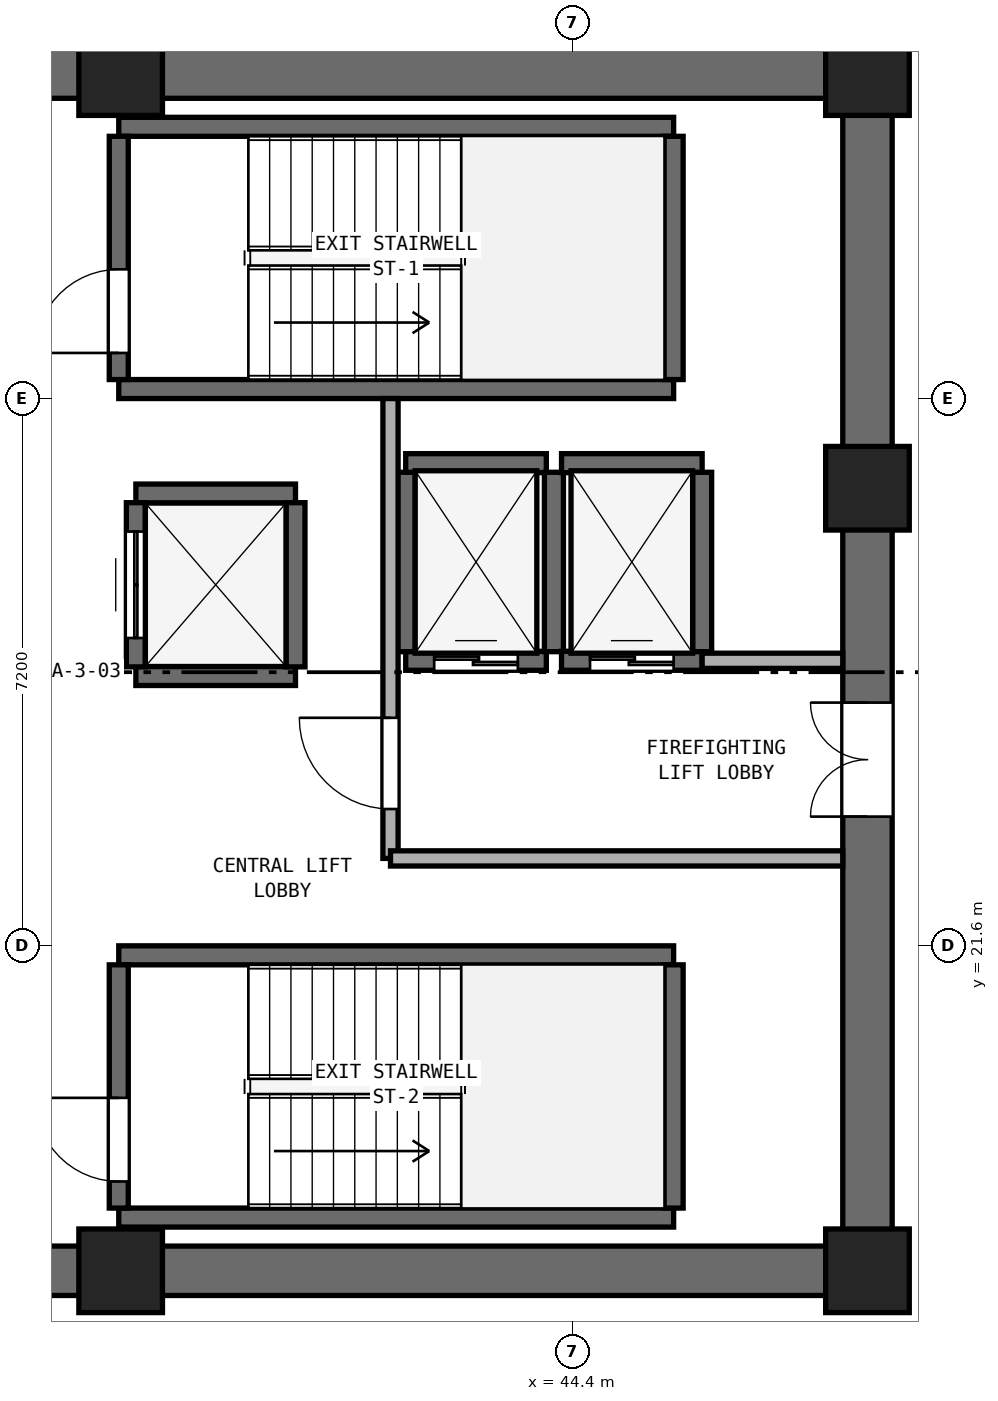
"""IFC4 building model, lengths in metres.
Left out: names, types, materials, properties, quantities, classifications, styles, units other than length and angle.
Written with IfcOpenShell. Run it as: python <this file> out.ifc"""

import sys

from ifc_helpers import new_model, si_unit, direction, frame, frame_2d, origin, origin_2d, place, context, subcontext, project, spatial, rectangle, extrude, element, fill, save


model = new_model("IFC4")
c1 = context("Model", 3, precision=1e-05, world=origin(), true_north=direction((0.0, 1.0)))
c2 = subcontext(c1, "Body", "Model", "MODEL_VIEW")
j1 = project(units=[si_unit("LENGTHUNIT", "METRE"), si_unit("PLANEANGLEUNIT", "RADIAN")], contexts=[c1])
p1 = place(None, origin())
s1 = spatial("IfcSite", under=j1, at=p1, CompositionType="ELEMENT")
p2 = place(p1, origin())
s2 = spatial("IfcBuilding", under=s1, at=p2, CompositionType="ELEMENT")
p3 = place(p2, frame((0.0, 0.0, 44.0)))
s3 = spatial("IfcBuildingStorey", under=s2, at=p3, CompositionType="ELEMENT", Elevation=44.0)
for number, where, z_axis, x_axis in (
    (1, (25.4, 17.325, 0.0), (0.0, 0.0, 1.0), (1.0, 0.0, 0.0)),
    (2, (25.4, 33.075, 0.0), (0.0, 0.0, 1.0), (1.0, 0.0, 0.0)),
):
    element("IfcWall", number, at=place(p3, frame(where, z_axis=z_axis, x_axis=x_axis)), inside=s3, PredefinedType="SHEAR", context=c2, shape_type="SweptSolid", body=[
        extrude(rectangle(XDim=23.2, YDim=0.65, at=frame_2d((11.6, 0.0))), origin(), (0.0, 0.0, 1.0), 3.525),
    ])
p4 = place(p3, frame((48.275, 17.65, 0.0), z_axis=(0.0, 0.0, 1.0), x_axis=(0.0, 1.0, 0.0)))
e3 = element("IfcWall", 3, at=p4, inside=s3, PredefinedType="SHEAR", context=c2, shape_type="SweptSolid", body=[
    extrude(rectangle(XDim=15.1, YDim=0.65, at=frame_2d((7.55, 0.0))), origin(), (0.0, 0.0, 1.0), 3.525),
])
p5 = place(p4, frame((5.65, 0.0, 0.0)))
e4 = element("IfcOpeningElement", 4, at=p5, cuts=e3, PredefinedType="OPENING", context=c2, shape_type="SweptSolid", body=[
    extrude(rectangle(XDim=1.5, YDim=2.15, at=frame_2d((0.75, 1.075))), frame((0.0, 0.335, 0.0), z_axis=(0.0, -1.0, 0.0), x_axis=(1.0, 0.0, 0.0)), (0.0, 0.0, 1.0), 0.67),
])
for number, where, z_axis, x_axis in (
    (5, (38.45, 17.325, 0.0), (0.0, 0.0, 1.0), (1.0, 0.0, 0.0)),
    (6, (48.275, 17.325, 0.0), (0.0, 0.0, 1.0), (1.0, 0.0, 0.0)),
    (7, (48.275, 27.62, 0.0), (0.0, 0.0, 1.0), (1.0, 0.0, 0.0)),
    (8, (48.275, 33.075, 0.0), (0.0, 0.0, 1.0), (1.0, 0.0, 0.0)),
    (9, (38.45, 33.075, 0.0), (0.0, 0.0, 1.0), (1.0, 0.0, 0.0)),
):
    element("IfcColumn", number, at=place(p3, frame(where, z_axis=z_axis, x_axis=x_axis)), inside=s3, PredefinedType="PILASTER", context=c2, shape_type="SweptSolid", body=[
        extrude(rectangle(XDim=1.1, YDim=1.1, at=origin_2d()), origin(), (0.0, 0.0, 1.0), 3.8),
    ])
for number, where, z_axis, x_axis in (
    (10, (38.425, 28.925, 0.0), (0.0, 0.0, 1.0), (1.0, 0.0, 0.0)),
    (11, (38.425, 32.375, 0.0), (0.0, 0.0, 1.0), (1.0, 0.0, 0.0)),
):
    element("IfcWall", number, at=place(p3, frame(where, z_axis=z_axis, x_axis=x_axis)), inside=s3, PredefinedType="SHEAR", context=c2, shape_type="SweptSolid", body=[
        extrude(rectangle(XDim=7.3, YDim=0.25, at=frame_2d((3.65, 0.0))), origin(), (0.0, 0.0, 1.0), 3.525),
    ])
p6 = place(p3, frame((38.425, 29.05, 0.0), z_axis=(0.0, 0.0, 1.0), x_axis=(0.0, 1.0, 0.0)))
e12 = element("IfcWall", 12, at=p6, inside=s3, PredefinedType="SHEAR", context=c2, shape_type="SweptSolid", body=[
    extrude(rectangle(XDim=3.2, YDim=0.25, at=frame_2d((1.6, 0.0))), origin(), (0.0, 0.0, 1.0), 3.525),
])
p7 = place(p6, frame((0.35, 0.0, 0.0)))
e13 = element("IfcOpeningElement", 13, at=p7, cuts=e12, PredefinedType="OPENING", context=c2, shape_type="SweptSolid", body=[
    extrude(rectangle(XDim=1.1, YDim=2.15, at=frame_2d((0.55, 1.075))), frame((0.0, 0.135, 0.0), z_axis=(0.0, -1.0, 0.0), x_axis=(1.0, 0.0, 0.0)), (0.0, 0.0, 1.0), 0.27),
])
p8 = place(p3, frame((45.725, 29.05, 0.0), z_axis=(0.0, 0.0, 1.0), x_axis=(0.0, 1.0, 0.0)))
e14 = element("IfcWall", 14, at=p8, inside=s3, PredefinedType="SHEAR", context=c2, shape_type="SweptSolid", body=[
    extrude(rectangle(XDim=3.2, YDim=0.25, at=frame_2d((1.6, 0.0))), origin(), (0.0, 0.0, 1.0), 3.525),
])
for number, where, z_axis, x_axis in (
    (15, (38.425, 18.025, 0.0), (0.0, 0.0, 1.0), (1.0, 0.0, 0.0)),
    (16, (38.425, 21.475, 0.0), (0.0, 0.0, 1.0), (1.0, 0.0, 0.0)),
):
    element("IfcWall", number, at=place(p3, frame(where, z_axis=z_axis, x_axis=x_axis)), inside=s3, PredefinedType="SHEAR", context=c2, shape_type="SweptSolid", body=[
        extrude(rectangle(XDim=7.3, YDim=0.25, at=frame_2d((3.65, 0.0))), origin(), (0.0, 0.0, 1.0), 3.525),
    ])
p9 = place(p3, frame((38.425, 18.15, 0.0), z_axis=(0.0, 0.0, 1.0), x_axis=(0.0, 1.0, 0.0)))
e17 = element("IfcWall", 17, at=p9, inside=s3, PredefinedType="SHEAR", context=c2, shape_type="SweptSolid", body=[
    extrude(rectangle(XDim=3.2, YDim=0.25, at=frame_2d((1.6, 0.0))), origin(), (0.0, 0.0, 1.0), 3.525),
])
p10 = place(p9, frame((0.35, 0.0, 0.0)))
e18 = element("IfcOpeningElement", 18, at=p10, cuts=e17, PredefinedType="OPENING", context=c2, shape_type="SweptSolid", body=[
    extrude(rectangle(XDim=1.1, YDim=2.15, at=frame_2d((0.55, 1.075))), frame((0.0, 0.135, 0.0), z_axis=(0.0, -1.0, 0.0), x_axis=(1.0, 0.0, 0.0)), (0.0, 0.0, 1.0), 0.27),
])
p11 = place(p3, frame((45.725, 18.15, 0.0), z_axis=(0.0, 0.0, 1.0), x_axis=(0.0, 1.0, 0.0)))
e19 = element("IfcWall", 19, at=p11, inside=s3, PredefinedType="SHEAR", context=c2, shape_type="SweptSolid", body=[
    extrude(rectangle(XDim=3.2, YDim=0.25, at=frame_2d((1.6, 0.0))), origin(), (0.0, 0.0, 1.0), 3.525),
])
p12 = place(p3, frame((42.2, 25.35, 0.0), z_axis=(0.0, 0.0, 1.0), x_axis=(1.0, 0.0, 0.0)))
e20 = element("IfcWall", 20, at=p12, inside=s3, PredefinedType="SHEAR", context=c2, shape_type="SweptSolid", body=[
    extrude(rectangle(XDim=1.85, YDim=0.25, at=frame_2d((0.925, 0.0))), origin(), (0.0, 0.0, 1.0), 3.525),
])
p13 = place(p12, frame((0.375, 0.0, 0.0)))
e21 = element("IfcOpeningElement", 21, at=p13, cuts=e20, PredefinedType="OPENING", context=c2, shape_type="SweptSolid", body=[
    extrude(rectangle(XDim=1.1, YDim=2.15, at=frame_2d((0.55, 1.075))), frame((0.0, 0.135, 0.0), z_axis=(0.0, -1.0, 0.0), x_axis=(1.0, 0.0, 0.0)), (0.0, 0.0, 1.0), 0.27),
])
p14 = place(p3, frame((42.2, 27.95, 0.0), z_axis=(0.0, 0.0, 1.0), x_axis=(1.0, 0.0, 0.0)))
e22 = element("IfcWall", 22, at=p14, inside=s3, PredefinedType="SHEAR", context=c2, shape_type="SweptSolid", body=[
    extrude(rectangle(XDim=1.85, YDim=0.25, at=frame_2d((0.925, 0.0))), origin(), (0.0, 0.0, 1.0), 3.525),
])
for number, where, z_axis, x_axis in (
    (23, (42.2, 25.47, 0.0), (0.0, 0.0, 1.0), (0.0, 1.0, 0.0)),
    (24, (44.15, 25.47, 0.0), (0.0, 0.0, 1.0), (0.0, 1.0, 0.0)),
):
    element("IfcWall", number, at=place(p3, frame(where, z_axis=z_axis, x_axis=x_axis)), inside=s3, PredefinedType="SHEAR", context=c2, shape_type="SweptSolid", body=[
        extrude(rectangle(XDim=2.36, YDim=0.25, at=frame_2d((1.18, 0.0))), origin(), (0.0, 0.0, 1.0), 3.525),
    ])
p15 = place(p3, frame((44.25, 25.35, 0.0), z_axis=(0.0, 0.0, 1.0), x_axis=(1.0, 0.0, 0.0)))
e25 = element("IfcWall", 25, at=p15, inside=s3, PredefinedType="SHEAR", context=c2, shape_type="SweptSolid", body=[
    extrude(rectangle(XDim=1.85, YDim=0.25, at=frame_2d((0.925, 0.0))), origin(), (0.0, 0.0, 1.0), 3.525),
])
p16 = place(p15, frame((0.375, 0.0, 0.0)))
e26 = element("IfcOpeningElement", 26, at=p16, cuts=e25, PredefinedType="OPENING", context=c2, shape_type="SweptSolid", body=[
    extrude(rectangle(XDim=1.1, YDim=2.15, at=frame_2d((0.55, 1.075))), frame((0.0, 0.135, 0.0), z_axis=(0.0, -1.0, 0.0), x_axis=(1.0, 0.0, 0.0)), (0.0, 0.0, 1.0), 0.27),
])
p17 = place(p3, frame((44.25, 27.95, 0.0), z_axis=(0.0, 0.0, 1.0), x_axis=(1.0, 0.0, 0.0)))
e27 = element("IfcWall", 27, at=p17, inside=s3, PredefinedType="SHEAR", context=c2, shape_type="SweptSolid", body=[
    extrude(rectangle(XDim=1.85, YDim=0.25, at=frame_2d((0.925, 0.0))), origin(), (0.0, 0.0, 1.0), 3.525),
])
p18 = place(p3, frame((46.1, 25.47, 0.0), z_axis=(0.0, 0.0, 1.0), x_axis=(0.0, 1.0, 0.0)))
e28 = element("IfcWall", 28, at=p18, inside=s3, PredefinedType="SHEAR", context=c2, shape_type="SweptSolid", body=[
    extrude(rectangle(XDim=2.36, YDim=0.25, at=frame_2d((1.18, 0.0))), origin(), (0.0, 0.0, 1.0), 3.525),
])
for number, where, z_axis, x_axis in (
    (29, (38.65, 25.15, 0.0), (0.0, 0.0, 1.0), (1.0, 0.0, 0.0)),
    (30, (38.65, 27.55, 0.0), (0.0, 0.0, 1.0), (1.0, 0.0, 0.0)),
):
    element("IfcWall", number, at=place(p3, frame(where, z_axis=z_axis, x_axis=x_axis)), inside=s3, PredefinedType="SHEAR", context=c2, shape_type="SweptSolid", body=[
        extrude(rectangle(XDim=2.1, YDim=0.25, at=frame_2d((1.05, 0.0))), origin(), (0.0, 0.0, 1.0), 3.525),
    ])
p19 = place(p3, frame((38.65, 25.27, 0.0), z_axis=(0.0, 0.0, 1.0), x_axis=(0.0, 1.0, 0.0)))
e31 = element("IfcWall", 31, at=p19, inside=s3, PredefinedType="SHEAR", context=c2, shape_type="SweptSolid", body=[
    extrude(rectangle(XDim=2.16, YDim=0.25, at=frame_2d((1.08, 0.0))), origin(), (0.0, 0.0, 1.0), 3.525),
])
p20 = place(p19, frame((0.38, 0.0, 0.0)))
e32 = element("IfcOpeningElement", 32, at=p20, cuts=e31, PredefinedType="OPENING", context=c2, shape_type="SweptSolid", body=[
    extrude(rectangle(XDim=1.4, YDim=2.2, at=frame_2d((0.7, 1.1))), frame((0.0, 0.135, 0.0), z_axis=(0.0, -1.0, 0.0), x_axis=(1.0, 0.0, 0.0)), (0.0, 0.0, 1.0), 0.27),
])
p21 = place(p3, frame((40.75, 25.27, 0.0), z_axis=(0.0, 0.0, 1.0), x_axis=(0.0, 1.0, 0.0)))
e33 = element("IfcWall", 33, at=p21, inside=s3, PredefinedType="SHEAR", context=c2, shape_type="SweptSolid", body=[
    extrude(rectangle(XDim=2.16, YDim=0.25, at=frame_2d((1.08, 0.0))), origin(), (0.0, 0.0, 1.0), 3.525),
])
p22 = place(p3, frame((42.0, 22.75, 0.0), z_axis=(0.0, 0.0, 1.0), x_axis=(0.0, 1.0, 0.0)))
e34 = element("IfcWall", 34, at=p22, inside=s3, PredefinedType="SOLIDWALL", context=c2, shape_type="SweptSolid", body=[
    extrude(rectangle(XDim=6.05, YDim=0.2, at=frame_2d((3.025, 0.0))), origin(), (0.0, 0.0, 1.0), 3.525),
])
p23 = place(p22, frame((0.65, 0.0, 0.0)))
e35 = element("IfcOpeningElement", 35, at=p23, cuts=e34, PredefinedType="OPENING", context=c2, shape_type="SweptSolid", body=[
    extrude(rectangle(XDim=1.2, YDim=2.15, at=frame_2d((0.6, 1.075))), frame((0.0, 0.11, 0.0), z_axis=(0.0, -1.0, 0.0), x_axis=(1.0, 0.0, 0.0)), (0.0, 0.0, 1.0), 0.22),
])
p24 = place(p3, frame((42.0, 22.75, 0.0), z_axis=(0.0, 0.0, 1.0), x_axis=(1.0, 0.0, 0.0)))
e36 = element("IfcWall", 36, at=p24, inside=s3, PredefinedType="SOLIDWALL", context=c2, shape_type="SweptSolid", body=[
    extrude(rectangle(XDim=5.95, YDim=0.2, at=frame_2d((2.975, 0.0))), origin(), (0.0, 0.0, 1.0), 3.525),
])
p25 = place(p3, frame((46.1, 25.35, 0.0), z_axis=(0.0, 0.0, 1.0), x_axis=(1.0, 0.0, 0.0)))
e37 = element("IfcWall", 37, at=p25, inside=s3, PredefinedType="SOLIDWALL", context=c2, shape_type="SweptSolid", body=[
    extrude(rectangle(XDim=1.85, YDim=0.2, at=frame_2d((0.925, 0.0))), origin(), (0.0, 0.0, 1.0), 3.525),
])
p26 = place(p7, origin())
e38 = element("IfcDoor", 38, at=p26, inside=s3, OperationType="SINGLE_SWING_LEFT", PredefinedType="DOOR", context=c2, shape_type="SweptSolid", body=[
    extrude(rectangle(XDim=1.1, YDim=2.15, at=frame_2d((0.55, 1.075))), frame((0.0, 0.025, 0.0), z_axis=(0.0, -1.0, 0.0), x_axis=(1.0, 0.0, 0.0)), (0.0, 0.0, 1.0), 0.05),
])
fill(e13, e38)
p27 = place(p10, origin())
e39 = element("IfcDoor", 39, at=p27, inside=s3, OperationType="SINGLE_SWING_RIGHT", PredefinedType="DOOR", context=c2, shape_type="SweptSolid", body=[
    extrude(rectangle(XDim=1.1, YDim=2.15, at=frame_2d((0.55, 1.075))), frame((0.0, 0.025, 0.0), z_axis=(0.0, -1.0, 0.0), x_axis=(1.0, 0.0, 0.0)), (0.0, 0.0, 1.0), 0.05),
])
fill(e18, e39)
p28 = place(p13, origin())
e40 = element("IfcDoor", 40, at=p28, inside=s3, OperationType="DOUBLE_DOOR_SLIDING", PredefinedType="DOOR", context=c2, shape_type="SweptSolid", body=[
    extrude(rectangle(XDim=1.1, YDim=2.15, at=frame_2d((0.55, 1.075))), frame((0.0, 0.025, 0.0), z_axis=(0.0, -1.0, 0.0), x_axis=(1.0, 0.0, 0.0)), (0.0, 0.0, 1.0), 0.05),
])
fill(e21, e40)
p29 = place(p16, origin())
e41 = element("IfcDoor", 41, at=p29, inside=s3, OperationType="DOUBLE_DOOR_SLIDING", PredefinedType="DOOR", context=c2, shape_type="SweptSolid", body=[
    extrude(rectangle(XDim=1.1, YDim=2.15, at=frame_2d((0.55, 1.075))), frame((0.0, 0.025, 0.0), z_axis=(0.0, -1.0, 0.0), x_axis=(1.0, 0.0, 0.0)), (0.0, 0.0, 1.0), 0.05),
])
fill(e26, e41)
p30 = place(p20, origin())
e42 = element("IfcDoor", 42, at=p30, inside=s3, OperationType="DOUBLE_DOOR_SLIDING", PredefinedType="DOOR", context=c2, shape_type="SweptSolid", body=[
    extrude(rectangle(XDim=1.4, YDim=2.2, at=frame_2d((0.7, 1.1))), frame((0.0, 0.025, 0.0), z_axis=(0.0, -1.0, 0.0), x_axis=(1.0, 0.0, 0.0)), (0.0, 0.0, 1.0), 0.05),
])
fill(e32, e42)
p31 = place(p23, origin())
e43 = element("IfcDoor", 43, at=p31, inside=s3, OperationType="SINGLE_SWING_RIGHT", PredefinedType="DOOR", context=c2, shape_type="SweptSolid", body=[
    extrude(rectangle(XDim=1.2, YDim=2.15, at=frame_2d((0.6, 1.075))), frame((0.0, 0.025, 0.0), z_axis=(0.0, -1.0, 0.0), x_axis=(1.0, 0.0, 0.0)), (0.0, 0.0, 1.0), 0.05),
])
fill(e35, e43)
p32 = place(p5, origin())
e44 = element("IfcDoor", 44, at=p32, inside=s3, OperationType="DOUBLE_DOOR_SINGLE_SWING", PredefinedType="DOOR", context=c2, shape_type="SweptSolid", body=[
    extrude(rectangle(XDim=1.5, YDim=2.15, at=frame_2d((0.75, 1.075))), frame((0.0, 0.025, 0.0), z_axis=(0.0, -1.0, 0.0), x_axis=(1.0, 0.0, 0.0)), (0.0, 0.0, 1.0), 0.05),
])
fill(e4, e44)
save(model, sys.argv[1])
